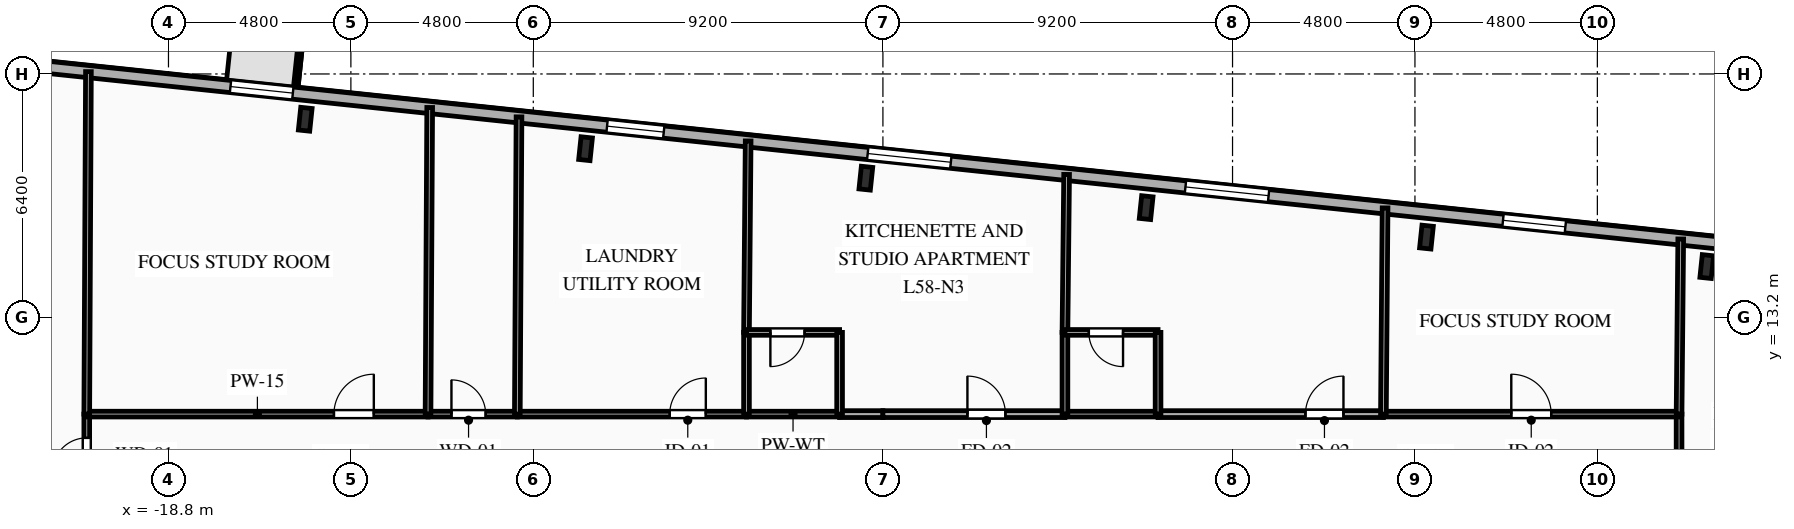
"""IFC4 building model, lengths in metres.
Left out: names, types, materials, properties, quantities, classifications, styles, units other than length and angle.
Written with IfcOpenShell. Run it as: python <this file> out.ifc"""

import sys

from ifc_helpers import new_model, si_unit, direction, frame, frame_2d, origin, origin_2d, place, context, subcontext, project, spatial, rectangle, i_section, extrude, element, fill, save


model = new_model("IFC4")
c1 = context("Model", 3, precision=1e-05, world=origin(), true_north=direction((0.0, 1.0)))
c2 = subcontext(c1, "Body", "Model", "MODEL_VIEW")
j1 = project(units=[si_unit("LENGTHUNIT", "METRE"), si_unit("PLANEANGLEUNIT", "RADIAN")], contexts=[c1])
p1 = place(None, origin())
s1 = spatial("IfcSite", under=j1, at=p1, CompositionType="ELEMENT")
p2 = place(p1, origin())
s2 = spatial("IfcBuilding", under=s1, at=p2, CompositionType="ELEMENT")
p3 = place(p2, frame((0.0, 0.0, 206.45)))
s3 = spatial("IfcBuildingStorey", under=s2, at=p3, CompositionType="ELEMENT", Elevation=206.45)
for number, where, z_axis, x_axis in (
    (1, (21.679, 14.532, 0.0), (0.0, 0.0, 1.0), (0.995, -0.105, 0.0)),
    (2, (14.303, 15.308, 0.0), (0.0, 0.0, 1.0), (0.995, -0.105, 0.0)),
    (3, (6.927, 16.083, 0.0), (0.0, 0.0, 1.0), (0.995, -0.105, 0.0)),
    (4, (-0.449, 16.858, 0.0), (0.0, 0.0, 1.0), (0.995, -0.105, 0.0)),
    (5, (-7.825, 17.634, 0.0), (0.0, 0.0, 1.0), (0.995, -0.105, 0.0)),
    (6, (-15.201, 18.409, 0.0), (0.0, 0.0, 1.0), (0.995, -0.105, 0.0)),
):
    element("IfcColumn", number, at=place(p3, frame(where, z_axis=z_axis, x_axis=x_axis)), inside=s3, PredefinedType="COLUMN", context=c2, shape_type="SweptSolid", body=[
        extrude(i_section(OverallWidth=0.3, OverallDepth=0.6, WebThickness=0.015, FlangeThickness=0.03, FilletRadius=0.027, at=origin_2d()), origin(), (0.0, 0.0, 1.0), 3.35),
    ])
p4 = place(p3, frame((-23.156, 19.898, 0.0), z_axis=(0.0, 0.0, 1.0), x_axis=(0.994522001802, -0.104527450613, 0.0)))
e7 = element("IfcWall", 7, at=p4, inside=s3, PredefinedType="SOLIDWALL", context=c2, shape_type="SweptSolid", body=[
    extrude(rectangle(XDim=45.8, YDim=0.32, at=frame_2d((22.9, 0.0))), origin(), (0.0, 0.0, 1.0), 3.04),
])
p5 = place(p4, frame((6.021, 0.0, 0.85)))
e8 = element("IfcOpeningElement", 8, at=p5, cuts=e7, PredefinedType="OPENING", context=c2, shape_type="SweptSolid", body=[
    extrude(rectangle(XDim=1.65, YDim=1.85, at=frame_2d((0.825, 0.925))), frame((0.0, 0.17, 0.0), z_axis=(0.0, -1.0, 0.0), x_axis=(1.0, 0.0, 0.0)), (0.0, 0.0, 1.0), 0.34),
])
p6 = place(p4, frame((15.985, 0.0, 0.85)))
e9 = element("IfcOpeningElement", 9, at=p6, cuts=e7, PredefinedType="OPENING", context=c2, shape_type="SweptSolid", body=[
    extrude(rectangle(XDim=1.5, YDim=1.85, at=frame_2d((0.75, 0.925))), frame((0.0, 0.17, 0.0), z_axis=(0.0, -1.0, 0.0), x_axis=(1.0, 0.0, 0.0)), (0.0, 0.0, 1.0), 0.34),
])
p7 = place(p4, frame((22.881, 0.0, 0.85)))
e10 = element("IfcOpeningElement", 10, at=p7, cuts=e7, PredefinedType="OPENING", context=c2, shape_type="SweptSolid", body=[
    extrude(rectangle(XDim=2.2, YDim=1.85, at=frame_2d((1.1, 0.925))), frame((0.0, 0.17, 0.0), z_axis=(0.0, -1.0, 0.0), x_axis=(1.0, 0.0, 0.0)), (0.0, 0.0, 1.0), 0.34),
])
p8 = place(p4, frame((31.288, 0.0, 0.85)))
e11 = element("IfcOpeningElement", 11, at=p8, cuts=e7, PredefinedType="OPENING", context=c2, shape_type="SweptSolid", body=[
    extrude(rectangle(XDim=2.2, YDim=1.85, at=frame_2d((1.1, 0.925))), frame((0.0, 0.17, 0.0), z_axis=(0.0, -1.0, 0.0), x_axis=(1.0, 0.0, 0.0)), (0.0, 0.0, 1.0), 0.34),
])
p9 = place(p4, frame((39.69, 0.0, 0.85)))
e12 = element("IfcOpeningElement", 12, at=p9, cuts=e7, PredefinedType="OPENING", context=c2, shape_type="SweptSolid", body=[
    extrude(rectangle(XDim=1.65, YDim=1.85, at=frame_2d((0.825, 0.925))), frame((0.0, 0.17, 0.0), z_axis=(0.0, -1.0, 0.0), x_axis=(1.0, 0.0, 0.0)), (0.0, 0.0, 1.0), 0.34),
])
p10 = place(p3, frame((-20.95, 8.5, 0.0), z_axis=(0.0, 0.0, 1.0), x_axis=(0.0, 1.0, 0.0)))
e13 = element("IfcWall", 13, at=p10, inside=s3, PredefinedType="PARTITIONING", context=c2, shape_type="SweptSolid", body=[
    extrude(rectangle(XDim=2.15, YDim=0.15, at=frame_2d((1.075, 0.0))), origin(), (0.0, 0.0, 1.0), 3.04),
])
p11 = place(p10, frame((0.625, 0.0, 0.0)))
e14 = element("IfcOpeningElement", 14, at=p11, cuts=e13, PredefinedType="OPENING", context=c2, shape_type="SweptSolid", body=[
    extrude(rectangle(XDim=0.9, YDim=2.1, at=frame_2d((0.45, 1.05))), frame((0.0, 0.085, 0.0), z_axis=(0.0, -1.0, 0.0), x_axis=(1.0, 0.0, 0.0)), (0.0, 0.0, 1.0), 0.17),
])
p12 = place(p3, frame((-20.95, 10.65, 0.0), z_axis=(0.0, 0.0, 1.0), x_axis=(1.0, 0.0, 0.0)))
e15 = element("IfcWall", 15, at=p12, inside=s3, PredefinedType="PARTITIONING", context=c2, shape_type="SweptSolid", body=[
    extrude(rectangle(XDim=8.98, YDim=0.15, at=frame_2d((4.49, 0.0))), origin(), (0.0, 0.0, 1.0), 3.04),
])
p13 = place(p12, frame((6.504, 0.0, 0.0)))
e16 = element("IfcOpeningElement", 16, at=p13, cuts=e15, PredefinedType="OPENING", context=c2, shape_type="SweptSolid", body=[
    extrude(rectangle(XDim=1.05, YDim=2.15, at=frame_2d((0.525, 1.075))), frame((0.0, 0.085, 0.0), z_axis=(0.0, -1.0, 0.0), x_axis=(1.0, 0.0, 0.0)), (0.0, 0.0, 1.0), 0.17),
])
p14 = place(p3, frame((-11.97, 10.65, 0.0), z_axis=(0.0, 0.0, 1.0), x_axis=(1.0, 0.0, 0.0)))
e17 = element("IfcWall", 17, at=p14, inside=s3, PredefinedType="PLUMBINGWALL", context=c2, shape_type="SweptSolid", body=[
    extrude(rectangle(XDim=2.35, YDim=0.15, at=frame_2d((1.175, 0.0))), origin(), (0.0, 0.0, 1.0), 3.04),
])
p15 = place(p14, frame((0.616, 0.0, 0.0)))
e18 = element("IfcOpeningElement", 18, at=p15, cuts=e17, PredefinedType="OPENING", context=c2, shape_type="SweptSolid", body=[
    extrude(rectangle(XDim=0.9, YDim=2.1, at=frame_2d((0.45, 1.05))), frame((0.0, 0.085, 0.0), z_axis=(0.0, -1.0, 0.0), x_axis=(1.0, 0.0, 0.0)), (0.0, 0.0, 1.0), 0.17),
])
p16 = place(p3, frame((-9.62, 10.65, 0.0), z_axis=(0.0, 0.0, 1.0), x_axis=(1.0, 0.0, 0.0)))
e19 = element("IfcWall", 19, at=p16, inside=s3, PredefinedType="PARTITIONING", context=c2, shape_type="SweptSolid", body=[
    extrude(rectangle(XDim=6.03, YDim=0.15, at=frame_2d((3.015, 0.0))), origin(), (0.0, 0.0, 1.0), 3.04),
])
p17 = place(p16, frame((4.01, 0.0, 0.0)))
e20 = element("IfcOpeningElement", 20, at=p17, cuts=e19, PredefinedType="OPENING", context=c2, shape_type="SweptSolid", body=[
    extrude(rectangle(XDim=0.95, YDim=2.1, at=frame_2d((0.475, 1.05))), frame((0.0, 0.085, 0.0), z_axis=(0.0, -1.0, 0.0), x_axis=(1.0, 0.0, 0.0)), (0.0, 0.0, 1.0), 0.17),
])
p18 = place(p3, frame((-1.14, 10.65, 0.0), z_axis=(0.0, 0.0, 1.0), x_axis=(1.0, 0.0, 0.0)))
e21 = element("IfcWall", 21, at=p18, inside=s3, PredefinedType="PARTITIONING", context=c2, shape_type="SweptSolid", body=[
    extrude(rectangle(XDim=1.14, YDim=0.18, at=frame_2d((0.57, 0.0))), origin(), (0.0, 0.0, 1.0), 3.04),
])
p19 = place(p3, frame((-3.59, 10.65, 0.0), z_axis=(0.0, 0.0, 1.0), x_axis=(1.0, 0.0, 0.0)))
e22 = element("IfcWall", 22, at=p19, inside=s3, PredefinedType="PLUMBINGWALL", context=c2, shape_type="SweptSolid", body=[
    extrude(rectangle(XDim=2.45, YDim=0.15, at=frame_2d((1.225, 0.0))), origin(), (0.0, 0.0, 1.0), 3.04),
])
p20 = place(p3, frame((20.95, 10.65, 0.0), z_axis=(0.0, 0.0, 1.0), x_axis=(0.0, -1.0, 0.0)))
e23 = element("IfcWall", 23, at=p20, inside=s3, PredefinedType="PARTITIONING", context=c2, shape_type="SweptSolid", body=[
    extrude(rectangle(XDim=2.15, YDim=0.15, at=frame_2d((1.075, 0.0))), origin(), (0.0, 0.0, 1.0), 3.04),
])
p21 = place(p3, frame((0.0, 10.65, 0.0), z_axis=(0.0, 0.0, 1.0), x_axis=(1.0, 0.0, 0.0)))
e24 = element("IfcWall", 24, at=p21, inside=s3, PredefinedType="PARTITIONING", context=c2, shape_type="SweptSolid", body=[
    extrude(rectangle(XDim=4.79, YDim=0.18, at=frame_2d((2.395, 0.0))), origin(), (0.0, 0.0, 1.0), 3.04),
])
p22 = place(p21, frame((2.224, 0.0, 0.0)))
e25 = element("IfcOpeningElement", 25, at=p22, cuts=e24, PredefinedType="OPENING", context=c2, shape_type="SweptSolid", body=[
    extrude(rectangle(XDim=1.0, YDim=2.15, at=frame_2d((0.5, 1.075))), frame((0.0, 0.1, 0.0), z_axis=(0.0, -1.0, 0.0), x_axis=(1.0, 0.0, 0.0)), (0.0, 0.0, 1.0), 0.2),
])
p23 = place(p3, frame((7.24, 10.65, 0.0), z_axis=(0.0, 0.0, 1.0), x_axis=(1.0, 0.0, 0.0)))
e26 = element("IfcWall", 26, at=p23, inside=s3, PredefinedType="PARTITIONING", context=c2, shape_type="SweptSolid", body=[
    extrude(rectangle(XDim=5.93, YDim=0.18, at=frame_2d((2.965, 0.0))), origin(), (0.0, 0.0, 1.0), 3.04),
])
p24 = place(p23, frame((3.879, 0.0, 0.0)))
e27 = element("IfcOpeningElement", 27, at=p24, cuts=e26, PredefinedType="OPENING", context=c2, shape_type="SweptSolid", body=[
    extrude(rectangle(XDim=1.0, YDim=2.15, at=frame_2d((0.5, 1.075))), frame((0.0, 0.1, 0.0), z_axis=(0.0, -1.0, 0.0), x_axis=(1.0, 0.0, 0.0)), (0.0, 0.0, 1.0), 0.2),
])
p25 = place(p3, frame((4.79, 10.65, 0.0), z_axis=(0.0, 0.0, 1.0), x_axis=(1.0, 0.0, 0.0)))
e28 = element("IfcWall", 28, at=p25, inside=s3, PredefinedType="PLUMBINGWALL", context=c2, shape_type="SweptSolid", body=[
    extrude(rectangle(XDim=2.45, YDim=0.15, at=frame_2d((1.225, 0.0))), origin(), (0.0, 0.0, 1.0), 3.04),
])
p26 = place(p3, frame((13.17, 10.65, 0.0), z_axis=(0.0, 0.0, 1.0), x_axis=(1.0, 0.0, 0.0)))
e29 = element("IfcWall", 29, at=p26, inside=s3, PredefinedType="PARTITIONING", context=c2, shape_type="SweptSolid", body=[
    extrude(rectangle(XDim=7.78, YDim=0.15, at=frame_2d((3.89, 0.0))), origin(), (0.0, 0.0, 1.0), 3.04),
])
p27 = place(p26, frame((3.365, 0.0, 0.0)))
e30 = element("IfcOpeningElement", 30, at=p27, cuts=e29, PredefinedType="OPENING", context=c2, shape_type="SweptSolid", body=[
    extrude(rectangle(XDim=1.05, YDim=2.15, at=frame_2d((0.525, 1.075))), frame((0.0, 0.085, 0.0), z_axis=(0.0, -1.0, 0.0), x_axis=(1.0, 0.0, 0.0)), (0.0, 0.0, 1.0), 0.17),
])
p28 = place(p3, frame((-20.906, 19.662, 0.0), z_axis=(0.0, 0.0, 1.0), x_axis=(-0.004876272857, -0.999988110911, 0.0)))
e31 = element("IfcWall", 31, at=p28, inside=s3, PredefinedType="PARTITIONING", context=c2, shape_type="SweptSolid", body=[
    extrude(rectangle(XDim=9.012, YDim=0.15, at=frame_2d((4.506, 0.0))), origin(), (0.0, 0.0, 1.0), 2.665),
])
p29 = place(p3, frame((20.95, 10.65, 0.0), z_axis=(0.0, 0.0, 1.0), x_axis=(0.009535990233, 0.999954531411, 0.0)))
e32 = element("IfcWall", 32, at=p29, inside=s3, PredefinedType="PARTITIONING", context=c2, shape_type="SweptSolid", body=[
    extrude(rectangle(XDim=4.608, YDim=0.15, at=frame_2d((2.304, 0.0))), origin(), (0.0, 0.0, 1.0), 2.665),
])
p30 = place(p3, frame((-11.926, 18.718, 0.0), z_axis=(0.0, 0.0, 1.0), x_axis=(-0.005446707114, -0.999985166581, 0.0)))
e33 = element("IfcWall", 33, at=p30, inside=s3, PredefinedType="PLUMBINGWALL", context=c2, shape_type="SweptSolid", body=[
    extrude(rectangle(XDim=8.068, YDim=0.15, at=frame_2d((4.034, 0.0))), origin(), (0.0, 0.0, 1.0), 3.04),
])
p31 = place(p3, frame((-9.576, 18.471, 0.0), z_axis=(0.0, 0.0, 1.0), x_axis=(-0.005618590299, -0.999984215597, 0.0)))
e34 = element("IfcWall", 34, at=p31, inside=s3, PredefinedType="PLUMBINGWALL", context=c2, shape_type="SweptSolid", body=[
    extrude(rectangle(XDim=7.822, YDim=0.15, at=frame_2d((3.911, 0.0))), origin(), (0.0, 0.0, 1.0), 3.04),
])
p32 = place(p3, frame((-3.546, 17.837, 0.0), z_axis=(0.0, 0.0, 1.0), x_axis=(-0.008723556964, -0.999961949053, 0.0)))
e35 = element("IfcWall", 35, at=p32, inside=s3, PredefinedType="PARTITIONING", context=c2, shape_type="SweptSolid", body=[
    extrude(rectangle(XDim=5.038, YDim=0.15, at=frame_2d((2.519, 0.0))), origin(), (0.0, 0.0, 1.0), 3.04),
])
p33 = place(p3, frame((-3.59, 12.8, 0.0), z_axis=(0.0, 0.0, 1.0), x_axis=(0.0, -1.0, 0.0)))
e36 = element("IfcWall", 36, at=p33, inside=s3, PredefinedType="PLUMBINGWALL", context=c2, shape_type="SweptSolid", body=[
    extrude(rectangle(XDim=2.15, YDim=0.15, at=frame_2d((1.075, 0.0))), origin(), (0.0, 0.0, 1.0), 3.04),
])
p34 = place(p3, frame((-1.14, 12.8, 0.0), z_axis=(0.0, 0.0, 1.0), x_axis=(-1.0, 0.0, 0.0)))
e37 = element("IfcWall", 37, at=p34, inside=s3, PredefinedType="PLUMBINGWALL", context=c2, shape_type="SweptSolid", body=[
    extrude(rectangle(XDim=2.45, YDim=0.15, at=frame_2d((1.225, 0.0))), origin(), (0.0, 0.0, 1.0), 3.04),
])
p35 = place(p34, frame((0.921, 0.0, 0.0)))
e38 = element("IfcOpeningElement", 38, at=p35, cuts=e37, PredefinedType="OPENING", context=c2, shape_type="SweptSolid", body=[
    extrude(rectangle(XDim=0.9, YDim=2.1, at=frame_2d((0.45, 1.05))), frame((0.0, 0.085, 0.0), z_axis=(0.0, -1.0, 0.0), x_axis=(1.0, 0.0, 0.0)), (0.0, 0.0, 1.0), 0.17),
])
p36 = place(p3, frame((-1.14, 10.65, 0.0), z_axis=(0.0, 0.0, 1.0), x_axis=(0.0, 1.0, 0.0)))
e39 = element("IfcWall", 39, at=p36, inside=s3, PredefinedType="PLUMBINGWALL", context=c2, shape_type="SweptSolid", body=[
    extrude(rectangle(XDim=2.15, YDim=0.15, at=frame_2d((1.075, 0.0))), origin(), (0.0, 0.0, 1.0), 3.04),
])
p37 = place(p3, frame((4.834, 16.957, 0.0), z_axis=(0.0, 0.0, 1.0), x_axis=(-0.010572096358, -0.999944113828, 0.0)))
e40 = element("IfcWall", 40, at=p37, inside=s3, PredefinedType="PARTITIONING", context=c2, shape_type="SweptSolid", body=[
    extrude(rectangle(XDim=4.157, YDim=0.15, at=frame_2d((2.078, 0.0))), origin(), (0.0, 0.0, 1.0), 3.04),
])
p38 = place(p3, frame((4.79, 12.8, 0.0), z_axis=(0.0, 0.0, 1.0), x_axis=(0.0, -1.0, 0.0)))
e41 = element("IfcWall", 41, at=p38, inside=s3, PredefinedType="PLUMBINGWALL", context=c2, shape_type="SweptSolid", body=[
    extrude(rectangle(XDim=2.15, YDim=0.15, at=frame_2d((1.075, 0.0))), origin(), (0.0, 0.0, 1.0), 3.04),
])
p39 = place(p3, frame((7.24, 12.8, 0.0), z_axis=(0.0, 0.0, 1.0), x_axis=(-1.0, 0.0, 0.0)))
e42 = element("IfcWall", 42, at=p39, inside=s3, PredefinedType="PLUMBINGWALL", context=c2, shape_type="SweptSolid", body=[
    extrude(rectangle(XDim=2.45, YDim=0.15, at=frame_2d((1.225, 0.0))), origin(), (0.0, 0.0, 1.0), 3.04),
])
p40 = place(p39, frame((0.921, 0.0, 0.0)))
e43 = element("IfcOpeningElement", 43, at=p40, cuts=e42, PredefinedType="OPENING", context=c2, shape_type="SweptSolid", body=[
    extrude(rectangle(XDim=0.9, YDim=2.1, at=frame_2d((0.45, 1.05))), frame((0.0, 0.085, 0.0), z_axis=(0.0, -1.0, 0.0), x_axis=(1.0, 0.0, 0.0)), (0.0, 0.0, 1.0), 0.17),
])
p41 = place(p3, frame((7.24, 10.65, 0.0), z_axis=(0.0, 0.0, 1.0), x_axis=(0.0, 1.0, 0.0)))
e44 = element("IfcWall", 44, at=p41, inside=s3, PredefinedType="PLUMBINGWALL", context=c2, shape_type="SweptSolid", body=[
    extrude(rectangle(XDim=2.15, YDim=0.15, at=frame_2d((1.075, 0.0))), origin(), (0.0, 0.0, 1.0), 3.04),
])
p42 = place(p3, frame((13.214, 16.076, 0.0), z_axis=(0.0, 0.0, 1.0), x_axis=(-0.008099086408, -0.999967201862, 0.0)))
e45 = element("IfcWall", 45, at=p42, inside=s3, PredefinedType="PARTITIONING", context=c2, shape_type="SweptSolid", body=[
    extrude(rectangle(XDim=5.426, YDim=0.15, at=frame_2d((2.713, 0.0))), origin(), (0.0, 0.0, 1.0), 3.04),
])
p43 = place(p5, origin())
e46 = element("IfcWindow", 46, at=p43, inside=s3, PartitioningType="SINGLE_PANEL", PredefinedType="WINDOW", context=c2, shape_type="SweptSolid", body=[
    extrude(rectangle(XDim=1.65, YDim=1.85, at=frame_2d((0.825, 0.925))), frame((0.0, 0.03, 0.0), z_axis=(0.0, -1.0, 0.0), x_axis=(1.0, 0.0, 0.0)), (0.0, 0.0, 1.0), 0.06),
])
fill(e8, e46)
p44 = place(p6, origin())
e47 = element("IfcWindow", 47, at=p44, inside=s3, PartitioningType="SINGLE_PANEL", PredefinedType="WINDOW", context=c2, shape_type="SweptSolid", body=[
    extrude(rectangle(XDim=1.5, YDim=1.85, at=frame_2d((0.75, 0.925))), frame((0.0, 0.03, 0.0), z_axis=(0.0, -1.0, 0.0), x_axis=(1.0, 0.0, 0.0)), (0.0, 0.0, 1.0), 0.06),
])
fill(e9, e47)
p45 = place(p7, origin())
e48 = element("IfcWindow", 48, at=p45, inside=s3, PartitioningType="SINGLE_PANEL", PredefinedType="WINDOW", context=c2, shape_type="SweptSolid", body=[
    extrude(rectangle(XDim=2.2, YDim=1.85, at=frame_2d((1.1, 0.925))), frame((0.0, 0.03, 0.0), z_axis=(0.0, -1.0, 0.0), x_axis=(1.0, 0.0, 0.0)), (0.0, 0.0, 1.0), 0.06),
])
fill(e10, e48)
p46 = place(p8, origin())
e49 = element("IfcWindow", 49, at=p46, inside=s3, PartitioningType="SINGLE_PANEL", PredefinedType="WINDOW", context=c2, shape_type="SweptSolid", body=[
    extrude(rectangle(XDim=2.2, YDim=1.85, at=frame_2d((1.1, 0.925))), frame((0.0, 0.03, 0.0), z_axis=(0.0, -1.0, 0.0), x_axis=(1.0, 0.0, 0.0)), (0.0, 0.0, 1.0), 0.06),
])
fill(e11, e49)
p47 = place(p9, origin())
e50 = element("IfcWindow", 50, at=p47, inside=s3, PartitioningType="SINGLE_PANEL", PredefinedType="WINDOW", context=c2, shape_type="SweptSolid", body=[
    extrude(rectangle(XDim=1.65, YDim=1.85, at=frame_2d((0.825, 0.925))), frame((0.0, 0.03, 0.0), z_axis=(0.0, -1.0, 0.0), x_axis=(1.0, 0.0, 0.0)), (0.0, 0.0, 1.0), 0.06),
])
fill(e12, e50)
p48 = place(p11, origin())
e51 = element("IfcDoor", 51, at=p48, inside=s3, OperationType="SINGLE_SWING_LEFT", PredefinedType="DOOR", context=c2, shape_type="SweptSolid", body=[
    extrude(rectangle(XDim=0.9, YDim=2.1, at=frame_2d((0.45, 1.05))), frame((0.0, 0.025, 0.0), z_axis=(0.0, -1.0, 0.0), x_axis=(1.0, 0.0, 0.0)), (0.0, 0.0, 1.0), 0.05),
])
fill(e14, e51)
p49 = place(p13, origin())
e52 = element("IfcDoor", 52, at=p49, inside=s3, OperationType="SINGLE_SWING_RIGHT", PredefinedType="DOOR", context=c2, shape_type="SweptSolid", body=[
    extrude(rectangle(XDim=1.05, YDim=2.15, at=frame_2d((0.525, 1.075))), frame((0.0, 0.025, 0.0), z_axis=(0.0, -1.0, 0.0), x_axis=(1.0, 0.0, 0.0)), (0.0, 0.0, 1.0), 0.05),
])
fill(e16, e52)
p50 = place(p15, origin())
e53 = element("IfcDoor", 53, at=p50, inside=s3, OperationType="SINGLE_SWING_LEFT", PredefinedType="DOOR", context=c2, shape_type="SweptSolid", body=[
    extrude(rectangle(XDim=0.9, YDim=2.1, at=frame_2d((0.45, 1.05))), frame((0.0, 0.025, 0.0), z_axis=(0.0, -1.0, 0.0), x_axis=(1.0, 0.0, 0.0)), (0.0, 0.0, 1.0), 0.05),
])
fill(e18, e53)
p51 = place(p17, origin())
e54 = element("IfcDoor", 54, at=p51, inside=s3, OperationType="SINGLE_SWING_RIGHT", PredefinedType="DOOR", context=c2, shape_type="SweptSolid", body=[
    extrude(rectangle(XDim=0.95, YDim=2.1, at=frame_2d((0.475, 1.05))), frame((0.0, 0.025, 0.0), z_axis=(0.0, -1.0, 0.0), x_axis=(1.0, 0.0, 0.0)), (0.0, 0.0, 1.0), 0.05),
])
fill(e20, e54)
p52 = place(p22, origin())
e55 = element("IfcDoor", 55, at=p52, inside=s3, OperationType="SINGLE_SWING_LEFT", PredefinedType="DOOR", context=c2, shape_type="SweptSolid", body=[
    extrude(rectangle(XDim=1.0, YDim=2.15, at=frame_2d((0.5, 1.075))), frame((0.0, 0.025, 0.0), z_axis=(0.0, -1.0, 0.0), x_axis=(1.0, 0.0, 0.0)), (0.0, 0.0, 1.0), 0.05),
])
fill(e25, e55)
p53 = place(p24, origin())
e56 = element("IfcDoor", 56, at=p53, inside=s3, OperationType="SINGLE_SWING_RIGHT", PredefinedType="DOOR", context=c2, shape_type="SweptSolid", body=[
    extrude(rectangle(XDim=1.0, YDim=2.15, at=frame_2d((0.5, 1.075))), frame((0.0, 0.025, 0.0), z_axis=(0.0, -1.0, 0.0), x_axis=(1.0, 0.0, 0.0)), (0.0, 0.0, 1.0), 0.05),
])
fill(e27, e56)
p54 = place(p27, origin())
e57 = element("IfcDoor", 57, at=p54, inside=s3, OperationType="SINGLE_SWING_LEFT", PredefinedType="DOOR", context=c2, shape_type="SweptSolid", body=[
    extrude(rectangle(XDim=1.05, YDim=2.15, at=frame_2d((0.525, 1.075))), frame((0.0, 0.025, 0.0), z_axis=(0.0, -1.0, 0.0), x_axis=(1.0, 0.0, 0.0)), (0.0, 0.0, 1.0), 0.05),
])
fill(e30, e57)
p55 = place(p35, origin())
e58 = element("IfcDoor", 58, at=p55, inside=s3, OperationType="SINGLE_SWING_RIGHT", PredefinedType="DOOR", context=c2, shape_type="SweptSolid", body=[
    extrude(rectangle(XDim=0.9, YDim=2.1, at=frame_2d((0.45, 1.05))), frame((0.0, 0.025, 0.0), z_axis=(0.0, -1.0, 0.0), x_axis=(1.0, 0.0, 0.0)), (0.0, 0.0, 1.0), 0.05),
])
fill(e38, e58)
p56 = place(p40, origin())
e59 = element("IfcDoor", 59, at=p56, inside=s3, OperationType="SINGLE_SWING_LEFT", PredefinedType="DOOR", context=c2, shape_type="SweptSolid", body=[
    extrude(rectangle(XDim=0.9, YDim=2.1, at=frame_2d((0.45, 1.05))), frame((0.0, 0.025, 0.0), z_axis=(0.0, -1.0, 0.0), x_axis=(1.0, 0.0, 0.0)), (0.0, 0.0, 1.0), 0.05),
])
fill(e43, e59)
save(model, sys.argv[1])
